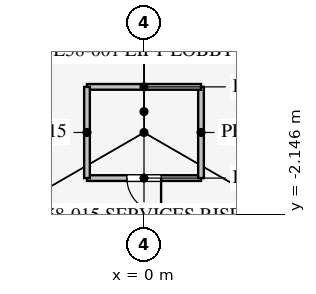
"""IFC4 building model, lengths in metres.
Left out: names, types, materials, properties, quantities, classifications, styles, units other than length and angle.
Written with IfcOpenShell. Run it as: python <this file> out.ifc"""

import sys

from ifc_helpers import new_model, si_unit, direction, frame, frame_2d, origin, place, context, subcontext, project, spatial, rectangle, extrude, element, fill, save


model = new_model("IFC4")
c1 = context("Model", 3, precision=1e-05, world=origin(), true_north=direction((0.0, 1.0)))
c2 = subcontext(c1, "Body", "Model", "MODEL_VIEW")
j1 = project(units=[si_unit("LENGTHUNIT", "METRE"), si_unit("PLANEANGLEUNIT", "RADIAN")], contexts=[c1])
p1 = place(None, origin())
s1 = spatial("IfcSite", under=j1, at=p1, CompositionType="ELEMENT")
p2 = place(p1, origin())
s2 = spatial("IfcBuilding", under=s1, at=p2, CompositionType="ELEMENT")
p3 = place(p2, frame((0.0, 0.0, 252.7)))
s3 = spatial("IfcBuildingStorey", under=s2, at=p3, CompositionType="ELEMENT", Elevation=252.7)
p4 = place(p3, frame((-1.5, -1.2, 0.0), z_axis=(0.0, 0.0, 1.0), x_axis=(1.0, 0.0, 0.0)))
e1 = element("IfcWall", 1, at=p4, inside=s3, PredefinedType="PARTITIONING", context=c2, shape_type="SweptSolid", body=[
    extrude(rectangle(XDim=3.0, YDim=0.15, at=frame_2d((1.5, 0.0))), origin(), (0.0, 0.0, 1.0), 4.0),
])
p5 = place(p4, frame((1.05, 0.0, 0.0)))
e2 = element("IfcOpeningElement", 2, at=p5, cuts=e1, PredefinedType="OPENING", context=c2, shape_type="SweptSolid", body=[
    extrude(rectangle(XDim=0.9, YDim=2.1, at=frame_2d((0.45, 1.05))), frame((0.0, 0.085, 0.0), z_axis=(0.0, -1.0, 0.0), x_axis=(1.0, 0.0, 0.0)), (0.0, 0.0, 1.0), 0.17),
])
p6 = place(p3, frame((1.5, -1.2, 0.0), z_axis=(0.0, 0.0, 1.0), x_axis=(0.0, 1.0, 0.0)))
e3 = element("IfcWall", 3, at=p6, inside=s3, PredefinedType="PARTITIONING", context=c2, shape_type="SweptSolid", body=[
    extrude(rectangle(XDim=2.4, YDim=0.15, at=frame_2d((1.2, 0.0))), origin(), (0.0, 0.0, 1.0), 4.0),
])
p7 = place(p3, frame((1.5, 1.2, 0.0), z_axis=(0.0, 0.0, 1.0), x_axis=(-1.0, 0.0, 0.0)))
e4 = element("IfcWall", 4, at=p7, inside=s3, PredefinedType="PARTITIONING", context=c2, shape_type="SweptSolid", body=[
    extrude(rectangle(XDim=3.0, YDim=0.15, at=frame_2d((1.5, 0.0))), origin(), (0.0, 0.0, 1.0), 4.0),
])
p8 = place(p3, frame((-1.5, 1.2, 0.0), z_axis=(0.0, 0.0, 1.0), x_axis=(0.0, -1.0, 0.0)))
e5 = element("IfcWall", 5, at=p8, inside=s3, PredefinedType="PARTITIONING", context=c2, shape_type="SweptSolid", body=[
    extrude(rectangle(XDim=2.4, YDim=0.15, at=frame_2d((1.2, 0.0))), origin(), (0.0, 0.0, 1.0), 4.0),
])
p9 = place(p5, frame((0.9, 0.0, 0.0), z_axis=(0.0, 0.0, 1.0), x_axis=(-1.0, 0.0, 0.0)))
e6 = element("IfcDoor", 6, at=p9, inside=s3, OperationType="SINGLE_SWING_LEFT", PredefinedType="DOOR", context=c2, shape_type="SweptSolid", body=[
    extrude(rectangle(XDim=0.9, YDim=2.1, at=frame_2d((0.45, 1.05))), frame((0.0, 0.025, 0.0), z_axis=(0.0, -1.0, 0.0), x_axis=(1.0, 0.0, 0.0)), (0.0, 0.0, 1.0), 0.05),
])
fill(e2, e6)
save(model, sys.argv[1])
